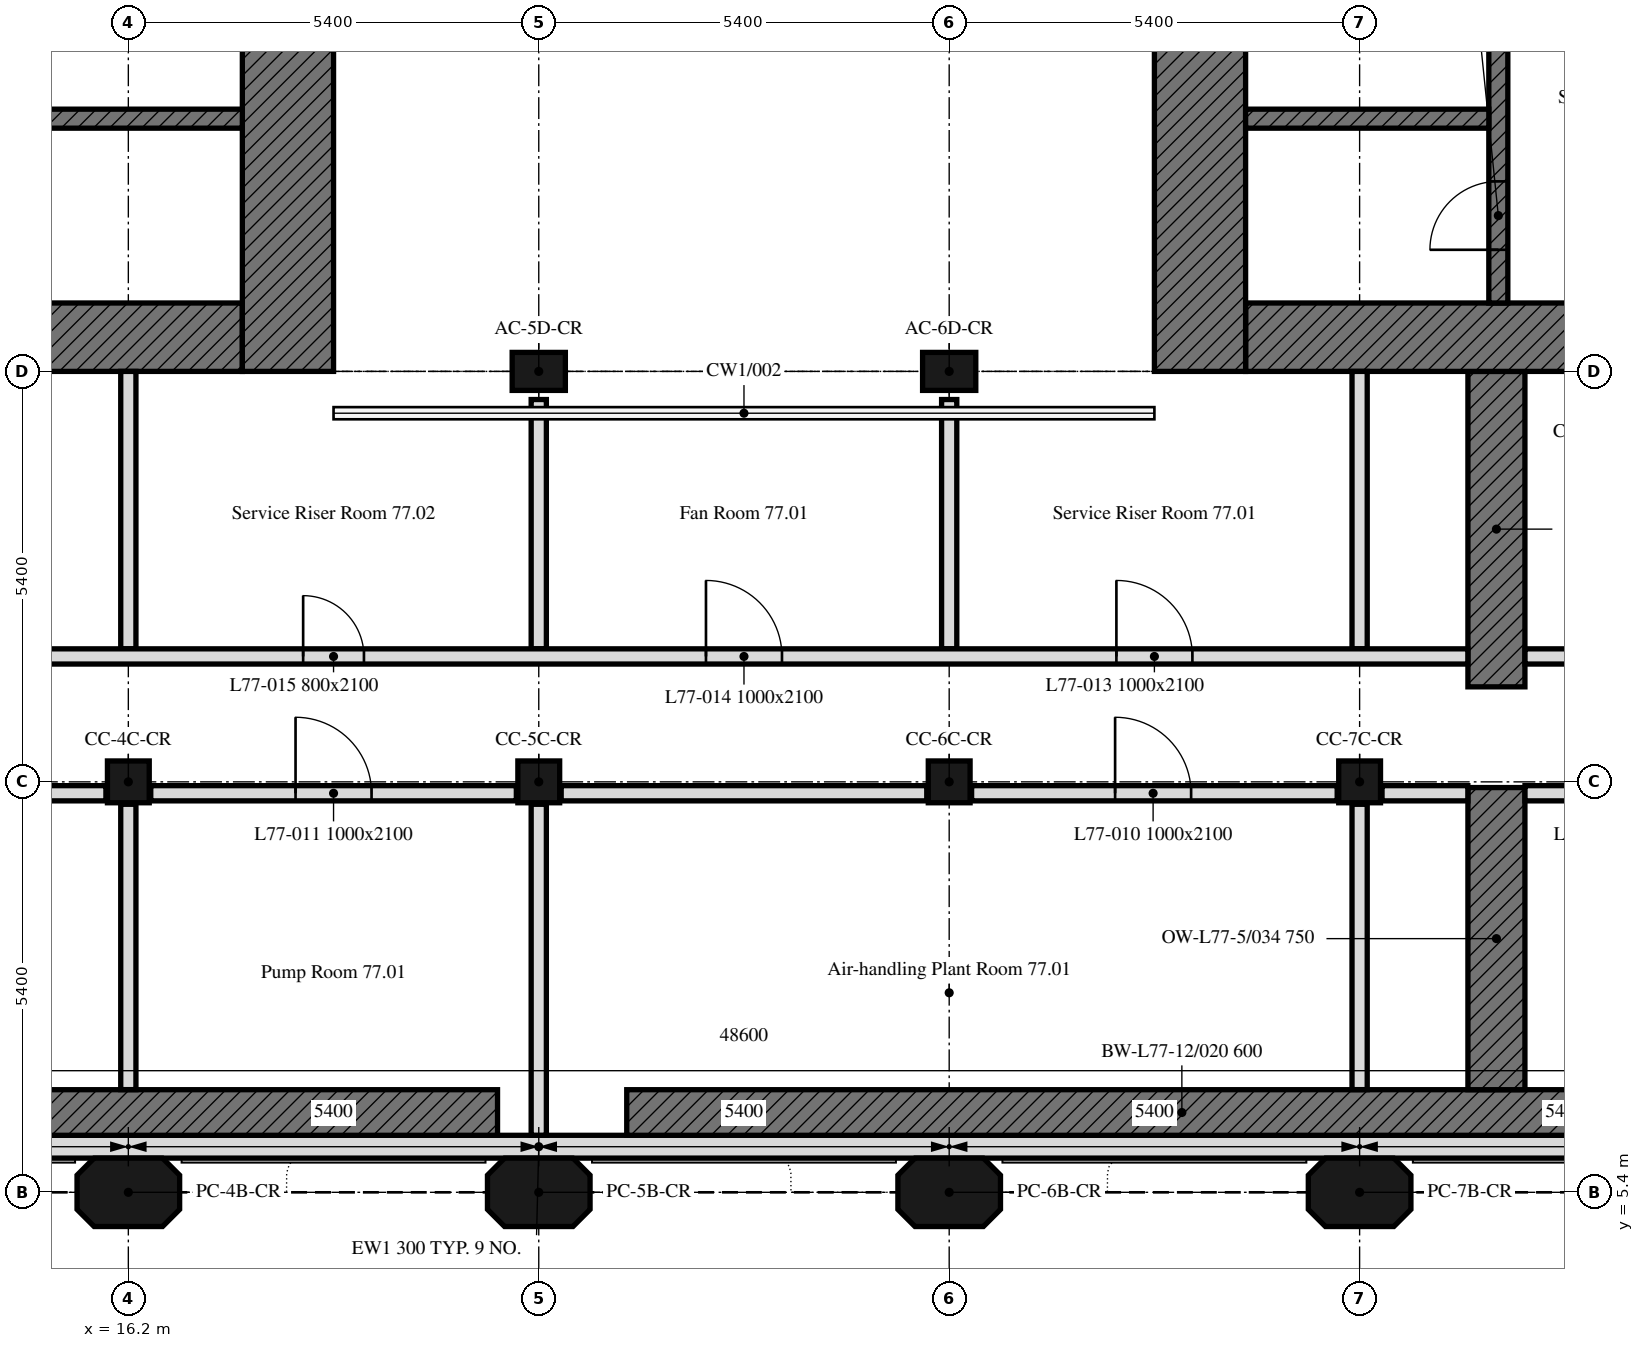
"""IFC4 building model, lengths in metres.
Left out: names, types, materials, properties, quantities, classifications, styles, units other than length and angle.
Written with IfcOpenShell. Run it as: python <this file> out.ifc"""

import sys

from ifc_helpers import new_model, si_unit, direction, frame, frame_2d, origin, origin_2d, place, context, subcontext, project, spatial, polyline, rectangle, outline, extrude, element, fill, save


model = new_model("IFC4")
c1 = context("Model", 3, precision=1e-05, world=origin(), true_north=direction((0.0, 1.0)))
c2 = subcontext(c1, "Body", "Model", "MODEL_VIEW")
j1 = project(units=[si_unit("LENGTHUNIT", "METRE"), si_unit("PLANEANGLEUNIT", "RADIAN")], contexts=[c1])
p1 = place(None, origin())
s1 = spatial("IfcSite", under=j1, at=p1, CompositionType="ELEMENT")
p2 = place(p1, origin())
s2 = spatial("IfcBuilding", under=s1, at=p2, CompositionType="ELEMENT")
p3 = place(p2, frame((0.0, 0.0, 308.2)))
s3 = spatial("IfcBuildingStorey", under=s2, at=p3, CompositionType="ELEMENT", Elevation=308.2)
for number, where, z_axis, x_axis in (
    (1, (16.2, 5.4, 0.0), (0.0, 0.0, 1.0), (1.0, 0.0, 0.0)),
    (2, (21.6, 5.4, 0.0), (0.0, 0.0, 1.0), (1.0, 0.0, 0.0)),
    (3, (27.0, 5.4, 0.0), (0.0, 0.0, 1.0), (1.0, 0.0, 0.0)),
    (4, (32.4, 5.4, 0.0), (0.0, 0.0, 1.0), (1.0, 0.0, 0.0)),
):
    element("IfcColumn", number, at=place(p3, frame(where, z_axis=z_axis, x_axis=x_axis)), inside=s3, PredefinedType="COLUMN", context=c2, shape_type="SweptSolid", body=[
        extrude(outline(polyline([(-0.45, -0.45), (0.45, -0.45), (0.675, -0.225), (0.675, 0.225), (0.45, 0.45), (-0.45, 0.45), (-0.675, 0.225), (-0.675, -0.225), (-0.45, -0.45)])), origin(), (0.0, 0.0, 1.0), 4.2),
    ])
for number, where, z_axis, x_axis in (
    (5, (16.2, 10.8, 0.0), (0.0, 0.0, 1.0), (1.0, 0.0, 0.0)),
    (6, (21.6, 10.8, 0.0), (0.0, 0.0, 1.0), (1.0, 0.0, 0.0)),
    (7, (27.0, 10.8, 0.0), (0.0, 0.0, 1.0), (1.0, 0.0, 0.0)),
    (8, (32.4, 10.8, 0.0), (0.0, 0.0, 1.0), (1.0, 0.0, 0.0)),
):
    element("IfcColumn", number, at=place(p3, frame(where, z_axis=z_axis, x_axis=x_axis)), inside=s3, PredefinedType="COLUMN", context=c2, shape_type="SweptSolid", body=[
        extrude(rectangle(XDim=0.55, YDim=0.55, at=origin_2d()), origin(), (0.0, 0.0, 1.0), 4.2),
    ])
for number, where, z_axis, x_axis in (
    (9, (21.6, 16.2, 0.0), (0.0, 0.0, 1.0), (1.0, 0.0, 0.0)),
    (10, (27.0, 16.2, 0.0), (0.0, 0.0, 1.0), (1.0, 0.0, 0.0)),
):
    element("IfcColumn", number, at=place(p3, frame(where, z_axis=z_axis, x_axis=x_axis)), inside=s3, PredefinedType="COLUMN", context=c2, shape_type="SweptSolid", body=[
        extrude(rectangle(XDim=0.7, YDim=0.5, at=origin_2d()), origin(), (0.0, 0.0, 1.0), 4.2),
    ])
p4 = place(p3, frame((37.365, 6.45, 0.0), z_axis=(0.0, 0.0, 1.0), x_axis=(-1.0, 0.0, 0.0)))
e11 = element("IfcWall", 11, at=p4, inside=s3, PredefinedType="SHEAR", context=c2, shape_type="SweptSolid", body=[
    extrude(rectangle(XDim=14.607, YDim=0.6, at=frame_2d((7.304, 0.0))), origin(), (0.0, 0.0, 1.0), 4.2),
])
p5 = place(p3, frame((21.058, 6.45, 0.0), z_axis=(0.0, 0.0, 1.0), x_axis=(-1.0, 0.0, 0.0)))
e12 = element("IfcWall", 12, at=p5, inside=s3, PredefinedType="SHEAR", context=c2, shape_type="SweptSolid", body=[
    extrude(rectangle(XDim=14.608, YDim=0.6, at=frame_2d((7.304, 0.0))), origin(), (0.0, 0.0, 1.0), 4.2),
])
p6 = place(p3, frame((34.2, 6.75, 0.0), z_axis=(0.0, 0.0, 1.0), x_axis=(0.0, 1.0, 0.0)))
e13 = element("IfcWall", 13, at=p6, inside=s3, PredefinedType="SHEAR", context=c2, shape_type="SweptSolid", body=[
    extrude(rectangle(XDim=3.975, YDim=0.75, at=frame_2d((1.988, 0.0))), origin(), (0.0, 0.0, 1.0), 4.2),
])
p7 = place(p3, frame((34.2, 12.05, 0.0), z_axis=(0.0, 0.0, 1.0), x_axis=(0.0, 1.0, 0.0)))
e14 = element("IfcWall", 14, at=p7, inside=s3, PredefinedType="SHEAR", context=c2, shape_type="SweptSolid", body=[
    extrude(rectangle(XDim=4.15, YDim=0.75, at=frame_2d((2.075, 0.0))), origin(), (0.0, 0.0, 1.0), 4.2),
])
p8 = place(p3, frame((5.586, 6.0, 0.0), z_axis=(0.0, 0.0, 1.0), x_axis=(1.0, 0.0, 0.0)))
e15 = element("IfcWall", 15, at=p8, inside=s3, PredefinedType="SOLIDWALL", context=c2, shape_type="SweptSolid", body=[
    extrude(outline(polyline([(0.0, 0.0), (32.027, 0.0), (32.027, 4.2), (31.434, 4.2), (30.841, 4.2), (30.248, 4.2), (29.655, 4.2), (29.062, 4.2), (28.469, 4.2), (27.875, 4.2), (27.282, 4.2), (26.689, 4.2), (26.096, 4.2), (25.503, 4.2), (24.91, 4.2), (24.317, 4.2), (23.724, 4.2), (23.131, 4.2), (22.538, 4.2), (21.945, 4.2), (21.352, 4.2), (20.758, 4.2), (20.165, 4.2), (19.572, 4.2), (18.979, 4.2), (18.386, 4.2), (17.793, 4.2), (17.2, 4.2), (16.607, 4.2), (16.014, 4.2), (15.42, 4.2), (14.827, 4.2), (14.234, 4.2), (13.641, 4.2), (13.048, 4.2), (12.455, 4.2), (11.862, 4.2), (11.269, 4.2), (10.676, 4.2), (10.083, 4.2), (9.49, 4.2), (8.896, 4.2), (8.303, 4.2), (7.71, 4.2), (7.117, 4.2), (6.524, 4.2), (5.931, 4.2), (5.338, 4.2), (4.745, 4.2), (4.152, 4.2), (3.559, 4.2), (2.966, 4.2), (2.372, 4.2), (1.779, 4.2), (1.186, 4.2), (0.593, 4.2), (0.0, 4.2), (0.0, 0.0)])), frame((0.0, 0.15, 0.0), z_axis=(0.0, -1.0, 0.0), x_axis=(1.0, 0.0, 0.0)), (0.0, 0.0, 1.0), 0.3),
])
p9 = place(p8, frame((1.014, 0.0, 0.6)))
e16 = element("IfcOpeningElement", 16, at=p9, cuts=e15, PredefinedType="OPENING", context=c2, shape_type="SweptSolid", body=[
    extrude(rectangle(XDim=3.0, YDim=1.8, at=frame_2d((1.5, 0.9))), frame((0.0, 0.16, 0.0), z_axis=(0.0, -1.0, 0.0), x_axis=(1.0, 0.0, 0.0)), (0.0, 0.0, 1.0), 0.32),
])
p10 = place(p3, frame((17.7, 16.65, 0.0), z_axis=(0.0, 0.0, 1.0), x_axis=(-1.0, 0.0, 0.0)))
e17 = element("IfcWall", 17, at=p10, inside=s3, PredefinedType="SOLIDWALL", context=c2, shape_type="SweptSolid", body=[
    extrude(rectangle(XDim=11.1, YDim=0.9, at=frame_2d((5.55, 0.0))), origin(), (0.0, 0.0, 1.0), 4.2),
])
p11 = place(p10, frame((5.55, 0.0, 0.0)))
e18 = element("IfcOpeningElement", 18, at=p11, cuts=e17, PredefinedType="OPENING", context=c2, shape_type="SweptSolid", body=[
    extrude(rectangle(XDim=2.0, YDim=2.4, at=frame_2d((1.0, 1.2))), frame((0.0, 0.45, 0.0), z_axis=(0.0, -1.0, 0.0), x_axis=(1.0, 0.0, 0.0)), (0.0, 0.0, 1.0), 0.9),
])
p12 = place(p3, frame((18.3, 32.4, 0.0), z_axis=(0.0, 0.0, 1.0), x_axis=(0.0, -1.0, 0.0)))
e19 = element("IfcWall", 19, at=p12, inside=s3, PredefinedType="SOLIDWALL", context=c2, shape_type="SweptSolid", body=[
    extrude(rectangle(XDim=16.2, YDim=1.2, at=frame_2d((8.1, 0.0))), origin(), (0.0, 0.0, 1.0), 4.2),
])
p13 = place(p3, frame((14.5, 19.525, 0.0), z_axis=(0.0, 0.0, 1.0), x_axis=(1.0, 0.0, 0.0)))
e20 = element("IfcWall", 20, at=p13, inside=s3, PredefinedType="SOLIDWALL", context=c2, shape_type="SweptSolid", body=[
    extrude(rectangle(XDim=3.2, YDim=0.25, at=frame_2d((1.6, 0.0))), origin(), (0.0, 0.0, 1.0), 4.2),
])
p14 = place(p3, frame((42.0, 16.65, 0.0), z_axis=(0.0, 0.0, 1.0), x_axis=(-1.0, 0.0, 0.0)))
e21 = element("IfcWall", 21, at=p14, inside=s3, PredefinedType="SOLIDWALL", context=c2, shape_type="SweptSolid", body=[
    extrude(rectangle(XDim=11.1, YDim=0.9, at=frame_2d((5.55, 0.0))), origin(), (0.0, 0.0, 1.0), 4.2),
])
p15 = place(p14, frame((3.55, 0.0, 0.0)))
e22 = element("IfcOpeningElement", 22, at=p15, cuts=e21, PredefinedType="OPENING", context=c2, shape_type="SweptSolid", body=[
    extrude(rectangle(XDim=2.0, YDim=2.4, at=frame_2d((1.0, 1.2))), frame((0.0, 0.45, 0.0), z_axis=(0.0, -1.0, 0.0), x_axis=(1.0, 0.0, 0.0)), (0.0, 0.0, 1.0), 0.9),
])
p16 = place(p3, frame((30.3, 16.2, 0.0), z_axis=(0.0, 0.0, 1.0), x_axis=(0.0, 1.0, 0.0)))
e23 = element("IfcWall", 23, at=p16, inside=s3, PredefinedType="SOLIDWALL", context=c2, shape_type="SweptSolid", body=[
    extrude(rectangle(XDim=16.2, YDim=1.2, at=frame_2d((8.1, 0.0))), origin(), (0.0, 0.0, 1.0), 4.2),
])
p17 = place(p3, frame((34.225, 17.1, 0.0), z_axis=(0.0, 0.0, 1.0), x_axis=(0.0, 1.0, 0.0)))
e24 = element("IfcWall", 24, at=p17, inside=s3, PredefinedType="SOLIDWALL", context=c2, shape_type="SweptSolid", body=[
    extrude(rectangle(XDim=14.4, YDim=0.25, at=frame_2d((7.2, 0.0))), origin(), (0.0, 0.0, 1.0), 4.2),
])
p18 = place(p17, frame((13.15, 0.0, 0.0)))
e25 = element("IfcOpeningElement", 25, at=p18, cuts=e24, PredefinedType="OPENING", context=c2, shape_type="SweptSolid", body=[
    extrude(rectangle(XDim=1.0, YDim=2.1, at=frame_2d((0.5, 1.05))), frame((0.0, 0.125, 0.0), z_axis=(0.0, -1.0, 0.0), x_axis=(1.0, 0.0, 0.0)), (0.0, 0.0, 1.0), 0.25),
])
p19 = place(p17, frame((0.7, 0.0, 0.0)))
e26 = element("IfcOpeningElement", 26, at=p19, cuts=e24, PredefinedType="OPENING", context=c2, shape_type="SweptSolid", body=[
    extrude(rectangle(XDim=0.9, YDim=2.1, at=frame_2d((0.45, 1.05))), frame((0.0, 0.125, 0.0), z_axis=(0.0, -1.0, 0.0), x_axis=(1.0, 0.0, 0.0)), (0.0, 0.0, 1.0), 0.25),
])
p20 = place(p17, frame((6.175, 0.0, 0.0)))
e27 = element("IfcOpeningElement", 27, at=p20, cuts=e24, PredefinedType="OPENING", context=c2, shape_type="SweptSolid", body=[
    extrude(rectangle(XDim=0.9, YDim=2.1, at=frame_2d((0.45, 1.05))), frame((0.0, 0.125, 0.0), z_axis=(0.0, -1.0, 0.0), x_axis=(1.0, 0.0, 0.0)), (0.0, 0.0, 1.0), 0.25),
])
p21 = place(p3, frame((30.9, 19.525, 0.0), z_axis=(0.0, 0.0, 1.0), x_axis=(1.0, 0.0, 0.0)))
e28 = element("IfcWall", 28, at=p21, inside=s3, PredefinedType="SOLIDWALL", context=c2, shape_type="SweptSolid", body=[
    extrude(rectangle(XDim=3.2, YDim=0.25, at=frame_2d((1.6, 0.0))), origin(), (0.0, 0.0, 1.0), 4.2),
])
p22 = place(p3, frame((32.4, 6.751, 0.0), z_axis=(0.0, 0.0, 1.0), x_axis=(0.0, 1.0, 0.0)))
e29 = element("IfcWall", 29, at=p22, inside=s3, PredefinedType="PARTITIONING", context=c2, shape_type="SweptSolid", body=[
    extrude(rectangle(XDim=3.754, YDim=0.2, at=frame_2d((1.877, 0.0))), origin(), (0.0, 0.0, 1.0), 4.2),
])
p23 = place(p3, frame((32.695, 10.65, 0.0), z_axis=(0.0, 0.0, 1.0), x_axis=(1.0, 0.0, 0.0)))
e30 = element("IfcWall", 30, at=p23, inside=s3, PredefinedType="PARTITIONING", context=c2, shape_type="SweptSolid", body=[
    extrude(rectangle(XDim=1.129, YDim=0.2, at=frame_2d((0.564, 0.0))), origin(), (0.0, 0.0, 1.0), 4.2),
])
p24 = place(p3, frame((34.576, 10.65, 0.0), z_axis=(0.0, 0.0, 1.0), x_axis=(1.0, 0.0, 0.0)))
e31 = element("IfcWall", 31, at=p24, inside=s3, PredefinedType="PARTITIONING", context=c2, shape_type="SweptSolid", body=[
    extrude(rectangle(XDim=2.929, YDim=0.2, at=frame_2d((1.464, 0.0))), origin(), (0.0, 0.0, 1.0), 4.2),
])
p25 = place(p24, frame((0.92, 0.0, 0.0)))
e32 = element("IfcOpeningElement", 32, at=p25, cuts=e31, PredefinedType="OPENING", context=c2, shape_type="SweptSolid", body=[
    extrude(rectangle(XDim=1.0, YDim=2.1, at=frame_2d((0.5, 1.05))), frame((0.0, 0.1, 0.0), z_axis=(0.0, -1.0, 0.0), x_axis=(1.0, 0.0, 0.0)), (0.0, 0.0, 1.0), 0.2),
])
p26 = place(p3, frame((21.6, 6.151, 0.0), z_axis=(0.0, 0.0, 1.0), x_axis=(0.0, 1.0, 0.0)))
e33 = element("IfcWall", 33, at=p26, inside=s3, PredefinedType="PARTITIONING", context=c2, shape_type="SweptSolid", body=[
    extrude(rectangle(XDim=4.354, YDim=0.2, at=frame_2d((2.177, 0.0))), origin(), (0.0, 0.0, 1.0), 4.2),
])
p27 = place(p3, frame((21.895, 10.65, 0.0), z_axis=(0.0, 0.0, 1.0), x_axis=(1.0, 0.0, 0.0)))
e34 = element("IfcWall", 34, at=p27, inside=s3, PredefinedType="PARTITIONING", context=c2, shape_type="SweptSolid", body=[
    extrude(rectangle(XDim=4.81, YDim=0.2, at=frame_2d((2.405, 0.0))), origin(), (0.0, 0.0, 1.0), 4.2),
])
p28 = place(p3, frame((27.295, 10.65, 0.0), z_axis=(0.0, 0.0, 1.0), x_axis=(1.0, 0.0, 0.0)))
e35 = element("IfcWall", 35, at=p28, inside=s3, PredefinedType="PARTITIONING", context=c2, shape_type="SweptSolid", body=[
    extrude(rectangle(XDim=4.81, YDim=0.2, at=frame_2d((2.405, 0.0))), origin(), (0.0, 0.0, 1.0), 4.2),
])
p29 = place(p28, frame((1.888, 0.0, 0.0)))
e36 = element("IfcOpeningElement", 36, at=p29, cuts=e35, PredefinedType="OPENING", context=c2, shape_type="SweptSolid", body=[
    extrude(rectangle(XDim=1.0, YDim=2.1, at=frame_2d((0.5, 1.05))), frame((0.0, 0.1, 0.0), z_axis=(0.0, -1.0, 0.0), x_axis=(1.0, 0.0, 0.0)), (0.0, 0.0, 1.0), 0.2),
])
p30 = place(p3, frame((16.2, 6.751, 0.0), z_axis=(0.0, 0.0, 1.0), x_axis=(0.0, 1.0, 0.0)))
e37 = element("IfcWall", 37, at=p30, inside=s3, PredefinedType="PARTITIONING", context=c2, shape_type="SweptSolid", body=[
    extrude(rectangle(XDim=3.754, YDim=0.2, at=frame_2d((1.877, 0.0))), origin(), (0.0, 0.0, 1.0), 4.2),
])
p31 = place(p3, frame((16.495, 10.65, 0.0), z_axis=(0.0, 0.0, 1.0), x_axis=(1.0, 0.0, 0.0)))
e38 = element("IfcWall", 38, at=p31, inside=s3, PredefinedType="PARTITIONING", context=c2, shape_type="SweptSolid", body=[
    extrude(rectangle(XDim=4.81, YDim=0.2, at=frame_2d((2.405, 0.0))), origin(), (0.0, 0.0, 1.0), 4.2),
])
p32 = place(p31, frame((1.905, 0.0, 0.0)))
e39 = element("IfcOpeningElement", 39, at=p32, cuts=e38, PredefinedType="OPENING", context=c2, shape_type="SweptSolid", body=[
    extrude(rectangle(XDim=1.0, YDim=2.1, at=frame_2d((0.5, 1.05))), frame((0.0, 0.1, 0.0), z_axis=(0.0, -1.0, 0.0), x_axis=(1.0, 0.0, 0.0)), (0.0, 0.0, 1.0), 0.2),
])
p33 = place(p3, frame((13.876, 10.65, 0.0), z_axis=(0.0, 0.0, 1.0), x_axis=(1.0, 0.0, 0.0)))
e40 = element("IfcWall", 40, at=p33, inside=s3, PredefinedType="PARTITIONING", context=c2, shape_type="SweptSolid", body=[
    extrude(rectangle(XDim=2.029, YDim=0.2, at=frame_2d((1.015, 0.0))), origin(), (0.0, 0.0, 1.0), 4.2),
])
p34 = place(p3, frame((32.4, 12.55, 0.0), z_axis=(0.0, 0.0, 1.0), x_axis=(0.0, 1.0, 0.0)))
e41 = element("IfcWall", 41, at=p34, inside=s3, PredefinedType="PARTITIONING", context=c2, shape_type="SweptSolid", body=[
    extrude(rectangle(XDim=3.65, YDim=0.2, at=frame_2d((1.825, 0.0))), origin(), (0.0, 0.0, 1.0), 4.2),
])
for number, where, z_axis, x_axis in (
    (42, (27.0, 15.83, 0.0), (0.0, 0.0, 1.0), (0.0, -1.0, 0.0)),
    (43, (21.6, 15.83, 0.0), (0.0, 0.0, 1.0), (0.0, -1.0, 0.0)),
):
    element("IfcWall", number, at=place(p3, frame(where, z_axis=z_axis, x_axis=x_axis)), inside=s3, PredefinedType="PARTITIONING", context=c2, shape_type="SweptSolid", body=[
        extrude(rectangle(XDim=3.28, YDim=0.2, at=frame_2d((1.64, 0.0))), origin(), (0.0, 0.0, 1.0), 4.2),
    ])
p35 = place(p3, frame((16.2, 16.2, 0.0), z_axis=(0.0, 0.0, 1.0), x_axis=(0.0, -1.0, 0.0)))
e44 = element("IfcWall", 44, at=p35, inside=s3, PredefinedType="PARTITIONING", context=c2, shape_type="SweptSolid", body=[
    extrude(rectangle(XDim=3.65, YDim=0.2, at=frame_2d((1.825, 0.0))), origin(), (0.0, 0.0, 1.0), 4.2),
])
p36 = place(p3, frame((34.576, 12.45, 0.0), z_axis=(0.0, 0.0, 1.0), x_axis=(1.0, 0.0, 0.0)))
e45 = element("IfcWall", 45, at=p36, inside=s3, PredefinedType="PARTITIONING", context=c2, shape_type="SweptSolid", body=[
    extrude(rectangle(XDim=7.273, YDim=0.2, at=frame_2d((3.637, 0.0))), origin(), (0.0, 0.0, 1.0), 4.2),
])
p37 = place(p36, frame((4.252, 0.0, 0.0)))
e46 = element("IfcOpeningElement", 46, at=p37, cuts=e45, PredefinedType="OPENING", context=c2, shape_type="SweptSolid", body=[
    extrude(rectangle(XDim=1.8, YDim=2.4, at=frame_2d((0.9, 1.2))), frame((0.0, 0.1, 0.0), z_axis=(0.0, -1.0, 0.0), x_axis=(1.0, 0.0, 0.0)), (0.0, 0.0, 1.0), 0.2),
])
p38 = place(p3, frame((13.876, 12.45, 0.0), z_axis=(0.0, 0.0, 1.0), x_axis=(1.0, 0.0, 0.0)))
e47 = element("IfcWall", 47, at=p38, inside=s3, PredefinedType="PARTITIONING", context=c2, shape_type="SweptSolid", body=[
    extrude(rectangle(XDim=19.948, YDim=0.2, at=frame_2d((9.974, 0.0))), origin(), (0.0, 0.0, 1.0), 4.2),
])
p39 = place(p38, frame((15.324, 0.0, 0.0)))
e48 = element("IfcOpeningElement", 48, at=p39, cuts=e47, PredefinedType="OPENING", context=c2, shape_type="SweptSolid", body=[
    extrude(rectangle(XDim=1.0, YDim=2.1, at=frame_2d((0.5, 1.05))), frame((0.0, 0.1, 0.0), z_axis=(0.0, -1.0, 0.0), x_axis=(1.0, 0.0, 0.0)), (0.0, 0.0, 1.0), 0.2),
])
p40 = place(p38, frame((9.924, 0.0, 0.0)))
e49 = element("IfcOpeningElement", 49, at=p40, cuts=e47, PredefinedType="OPENING", context=c2, shape_type="SweptSolid", body=[
    extrude(rectangle(XDim=1.0, YDim=2.1, at=frame_2d((0.5, 1.05))), frame((0.0, 0.1, 0.0), z_axis=(0.0, -1.0, 0.0), x_axis=(1.0, 0.0, 0.0)), (0.0, 0.0, 1.0), 0.2),
])
p41 = place(p38, frame((4.624, 0.0, 0.0)))
e50 = element("IfcOpeningElement", 50, at=p41, cuts=e47, PredefinedType="OPENING", context=c2, shape_type="SweptSolid", body=[
    extrude(rectangle(XDim=0.8, YDim=2.1, at=frame_2d((0.4, 1.05))), frame((0.0, 0.1, 0.0), z_axis=(0.0, -1.0, 0.0), x_axis=(1.0, 0.0, 0.0)), (0.0, 0.0, 1.0), 0.2),
])
p42 = place(p19, origin())
e51 = element("IfcDoor", 51, at=p42, inside=s3, OperationType="SINGLE_SWING_LEFT", PredefinedType="DOOR", context=c2, shape_type="SweptSolid", body=[
    extrude(rectangle(XDim=0.9, YDim=2.1, at=frame_2d((0.45, 1.05))), frame((0.0, 0.025, 0.0), z_axis=(0.0, -1.0, 0.0), x_axis=(1.0, 0.0, 0.0)), (0.0, 0.0, 1.0), 0.05),
])
fill(e26, e51)
p43 = place(p29, origin())
e52 = element("IfcDoor", 52, at=p43, inside=s3, OperationType="SINGLE_SWING_LEFT", PredefinedType="DOOR", context=c2, shape_type="SweptSolid", body=[
    extrude(rectangle(XDim=1.0, YDim=2.1, at=frame_2d((0.5, 1.05))), frame((0.0, 0.025, 0.0), z_axis=(0.0, -1.0, 0.0), x_axis=(1.0, 0.0, 0.0)), (0.0, 0.0, 1.0), 0.05),
])
fill(e36, e52)
p44 = place(p32, origin())
e53 = element("IfcDoor", 53, at=p44, inside=s3, OperationType="SINGLE_SWING_LEFT", PredefinedType="DOOR", context=c2, shape_type="SweptSolid", body=[
    extrude(rectangle(XDim=1.0, YDim=2.1, at=frame_2d((0.5, 1.05))), frame((0.0, 0.025, 0.0), z_axis=(0.0, -1.0, 0.0), x_axis=(1.0, 0.0, 0.0)), (0.0, 0.0, 1.0), 0.05),
])
fill(e39, e53)
p45 = place(p39, origin())
e54 = element("IfcDoor", 54, at=p45, inside=s3, OperationType="SINGLE_SWING_LEFT", PredefinedType="DOOR", context=c2, shape_type="SweptSolid", body=[
    extrude(rectangle(XDim=1.0, YDim=2.1, at=frame_2d((0.5, 1.05))), frame((0.0, 0.025, 0.0), z_axis=(0.0, -1.0, 0.0), x_axis=(1.0, 0.0, 0.0)), (0.0, 0.0, 1.0), 0.05),
])
fill(e48, e54)
p46 = place(p40, origin())
e55 = element("IfcDoor", 55, at=p46, inside=s3, OperationType="SINGLE_SWING_RIGHT", PredefinedType="DOOR", context=c2, shape_type="SweptSolid", body=[
    extrude(rectangle(XDim=1.0, YDim=2.1, at=frame_2d((0.5, 1.05))), frame((0.0, 0.025, 0.0), z_axis=(0.0, -1.0, 0.0), x_axis=(1.0, 0.0, 0.0)), (0.0, 0.0, 1.0), 0.05),
])
fill(e49, e55)
p47 = place(p41, origin())
e56 = element("IfcDoor", 56, at=p47, inside=s3, OperationType="SINGLE_SWING_RIGHT", PredefinedType="DOOR", context=c2, shape_type="SweptSolid", body=[
    extrude(rectangle(XDim=0.8, YDim=2.1, at=frame_2d((0.4, 1.05))), frame((0.0, 0.025, 0.0), z_axis=(0.0, -1.0, 0.0), x_axis=(1.0, 0.0, 0.0)), (0.0, 0.0, 1.0), 0.05),
])
fill(e50, e56)
save(model, sys.argv[1])
